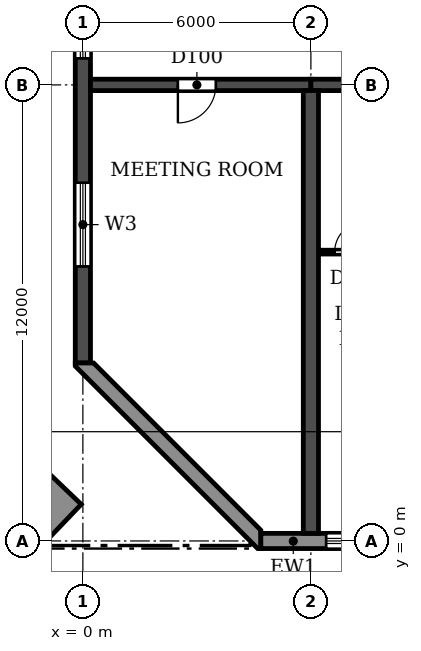
"""IFC4 building model, lengths in metres.
Left out: names, types, materials, properties, quantities, classifications, styles, units other than length and angle.
Written with IfcOpenShell. Run it as: python <this file> out.ifc"""

import sys

from ifc_helpers import new_model, si_unit, direction, frame, frame_2d, origin, place, context, subcontext, project, spatial, polyline, rectangle, outline, extrude, source, transform, mapped, element, fill, save


model = new_model("IFC4")
c1 = context("Model", 3, precision=1e-05, world=origin(), true_north=direction((0.0, 1.0)))
c2 = subcontext(c1, "Body", "Model", "MODEL_VIEW")
j1 = project(units=[si_unit("LENGTHUNIT", "METRE"), si_unit("PLANEANGLEUNIT", "RADIAN")], contexts=[c1])
p1 = place(None, origin())
s1 = spatial("IfcSite", under=j1, at=p1, CompositionType="ELEMENT")
p2 = place(p1, origin())
s2 = spatial("IfcBuilding", under=s1, at=p2, CompositionType="ELEMENT")
p3 = place(p2, frame((0.0, 0.0, 23.4)))
s3 = spatial("IfcBuildingStorey", under=s2, at=p3, CompositionType="ELEMENT", Elevation=23.4)
p4 = place(p3, frame((6.0, 0.2, 0.0), z_axis=(0.0, 0.0, 1.0), x_axis=(0.0, 1.0, 0.0)))
e1 = element("IfcWall", 1, at=p4, inside=s3, PredefinedType="SHEAR", context=c2, shape_type="SweptSolid", body=[
    extrude(rectangle(XDim=11.65, YDim=0.4, at=frame_2d((5.825, 0.0))), origin(), (0.0, 0.0, 1.0), 3.05),
])
p5 = place(p3, frame((0.0, 4.683, 0.0), z_axis=(0.0, 0.0, 1.0), x_axis=(0.0, 1.0, 0.0)))
e2 = element("IfcWall", 2, at=p5, inside=s3, PredefinedType="SHEAR", context=c2, shape_type="SweptSolid", body=[
    extrude(rectangle(XDim=35.434, YDim=0.4, at=frame_2d((17.717, 0.0))), origin(), (0.0, 0.0, 1.0), 3.05),
])
p6 = place(p5, frame((23.817, 0.0, 0.9)))
e3 = element("IfcOpeningElement", 3, at=p6, cuts=e2, PredefinedType="OPENING", context=c2, shape_type="SweptSolid", body=[
    extrude(rectangle(XDim=1.2, YDim=1.5, at=frame_2d((0.6, 0.75))), frame((0.0, 0.21, 0.0), z_axis=(0.0, -1.0, 0.0), x_axis=(1.0, 0.0, 0.0)), (0.0, 0.0, 1.0), 0.42),
])
p7 = place(p5, frame((8.017, 0.0, 0.9)))
e4 = element("IfcOpeningElement", 4, at=p7, cuts=e2, PredefinedType="OPENING", context=c2, shape_type="SweptSolid", body=[
    extrude(rectangle(XDim=1.2, YDim=1.5, at=frame_2d((0.6, 0.75))), frame((0.0, 0.21, 0.0), z_axis=(0.0, -1.0, 0.0), x_axis=(1.0, 0.0, 0.0)), (0.0, 0.0, 1.0), 0.42),
])
p8 = place(p5, frame((15.917, 0.0, 0.9)))
e5 = element("IfcOpeningElement", 5, at=p8, cuts=e2, PredefinedType="OPENING", context=c2, shape_type="SweptSolid", body=[
    extrude(rectangle(XDim=1.2, YDim=1.5, at=frame_2d((0.6, 0.75))), frame((0.0, 0.21, 0.0), z_axis=(0.0, -1.0, 0.0), x_axis=(1.0, 0.0, 0.0)), (0.0, 0.0, 1.0), 0.42),
])
p9 = place(p5, frame((29.493, 0.0, 0.6)))
e6 = element("IfcOpeningElement", 6, at=p9, cuts=e2, PredefinedType="OPENING", context=c2, shape_type="SweptSolid", body=[
    extrude(rectangle(XDim=2.2, YDim=1.8, at=frame_2d((1.1, 0.9))), frame((0.0, 0.21, 0.0), z_axis=(0.0, -1.0, 0.0), x_axis=(1.0, 0.0, 0.0)), (0.0, 0.0, 1.0), 0.42),
])
p10 = place(p5, frame((2.541, 0.0, 0.6)))
e7 = element("IfcOpeningElement", 7, at=p10, cuts=e2, PredefinedType="OPENING", context=c2, shape_type="SweptSolid", body=[
    extrude(rectangle(XDim=2.2, YDim=1.8, at=frame_2d((1.1, 0.9))), frame((0.0, 0.21, 0.0), z_axis=(0.0, -1.0, 0.0), x_axis=(1.0, 0.0, 0.0)), (0.0, 0.0, 1.0), 0.42),
])
p11 = place(p3, frame((0.2, 12.0, 0.0), z_axis=(0.0, 0.0, 1.0), x_axis=(1.0, 0.0, 0.0)))
e8 = element("IfcWall", 8, at=p11, inside=s3, PredefinedType="SHEAR", context=c2, shape_type="SweptSolid", body=[
    extrude(rectangle(XDim=5.8, YDim=0.3, at=frame_2d((2.9, 0.0))), origin(), (0.0, 0.0, 1.0), 2.45),
])
p12 = place(p11, frame((2.3, 0.0, 0.0)))
e9 = element("IfcOpeningElement", 9, at=p12, cuts=e8, PredefinedType="OPENING", context=c2, shape_type="SweptSolid", body=[
    extrude(rectangle(XDim=1.0, YDim=2.1, at=frame_2d((0.5, 1.05))), frame((0.0, 0.16, 0.0), z_axis=(0.0, -1.0, 0.0), x_axis=(1.0, 0.0, 0.0)), (0.0, 0.0, 1.0), 0.32),
])
p13 = place(p3, frame((6.0, 12.0, 0.0), z_axis=(0.0, 0.0, 1.0), x_axis=(1.0, 0.0, 0.0)))
e10 = element("IfcWall", 10, at=p13, inside=s3, PredefinedType="SHEAR", context=c2, shape_type="SweptSolid", body=[
    extrude(rectangle(XDim=6.0, YDim=0.3, at=frame_2d((3.0, 0.0))), origin(), (0.0, 0.0, 1.0), 2.45),
])
p14 = place(p13, frame((2.45, 0.0, 0.0)))
e11 = element("IfcOpeningElement", 11, at=p14, cuts=e10, PredefinedType="OPENING", context=c2, shape_type="SweptSolid", body=[
    extrude(rectangle(XDim=1.0, YDim=2.1, at=frame_2d((0.5, 1.05))), frame((0.0, 0.16, 0.0), z_axis=(0.0, -1.0, 0.0), x_axis=(1.0, 0.0, 0.0)), (0.0, 0.0, 1.0), 0.32),
])
p15 = place(p3, frame((4.683, 0.0, 0.0), z_axis=(0.0, 0.0, 1.0), x_axis=(1.0, 0.0, 0.0)))
e12 = element("IfcWall", 12, at=p15, inside=s3, PredefinedType="STANDARD", context=c2, shape_type="SweptSolid", body=[
    extrude(rectangle(XDim=92.634, YDim=0.4, at=frame_2d((46.317, 0.0))), origin(), (0.0, 0.0, 1.0), 3.05),
])
p16 = place(p15, frame((1.717, 0.0, 0.9)))
e13 = element("IfcOpeningElement", 13, at=p16, cuts=e12, PredefinedType="OPENING", context=c2, shape_type="SweptSolid", body=[
    extrude(rectangle(XDim=2.2, YDim=1.5, at=frame_2d((1.1, 0.75))), frame((0.0, 0.21, 0.0), z_axis=(0.0, -1.0, 0.0), x_axis=(1.0, 0.0, 0.0)), (0.0, 0.0, 1.0), 0.42),
])
p17 = place(p15, frame((4.717, 0.0, 0.9)))
e14 = element("IfcOpeningElement", 14, at=p17, cuts=e12, PredefinedType="OPENING", context=c2, shape_type="SweptSolid", body=[
    extrude(rectangle(XDim=2.2, YDim=1.5, at=frame_2d((1.1, 0.75))), frame((0.0, 0.21, 0.0), z_axis=(0.0, -1.0, 0.0), x_axis=(1.0, 0.0, 0.0)), (0.0, 0.0, 1.0), 0.42),
])
p18 = place(p15, frame((7.717, 0.0, 0.9)))
e15 = element("IfcOpeningElement", 15, at=p18, cuts=e12, PredefinedType="OPENING", context=c2, shape_type="SweptSolid", body=[
    extrude(rectangle(XDim=2.2, YDim=1.5, at=frame_2d((1.1, 0.75))), frame((0.0, 0.21, 0.0), z_axis=(0.0, -1.0, 0.0), x_axis=(1.0, 0.0, 0.0)), (0.0, 0.0, 1.0), 0.42),
])
p19 = place(p15, frame((10.717, 0.0, 0.9)))
e16 = element("IfcOpeningElement", 16, at=p19, cuts=e12, PredefinedType="OPENING", context=c2, shape_type="SweptSolid", body=[
    extrude(rectangle(XDim=2.2, YDim=1.5, at=frame_2d((1.1, 0.75))), frame((0.0, 0.21, 0.0), z_axis=(0.0, -1.0, 0.0), x_axis=(1.0, 0.0, 0.0)), (0.0, 0.0, 1.0), 0.42),
])
p20 = place(p15, frame((13.717, 0.0, 0.9)))
e17 = element("IfcOpeningElement", 17, at=p20, cuts=e12, PredefinedType="OPENING", context=c2, shape_type="SweptSolid", body=[
    extrude(rectangle(XDim=2.2, YDim=1.5, at=frame_2d((1.1, 0.75))), frame((0.0, 0.21, 0.0), z_axis=(0.0, -1.0, 0.0), x_axis=(1.0, 0.0, 0.0)), (0.0, 0.0, 1.0), 0.42),
])
p21 = place(p15, frame((16.717, 0.0, 0.9)))
e18 = element("IfcOpeningElement", 18, at=p21, cuts=e12, PredefinedType="OPENING", context=c2, shape_type="SweptSolid", body=[
    extrude(rectangle(XDim=2.2, YDim=1.5, at=frame_2d((1.1, 0.75))), frame((0.0, 0.21, 0.0), z_axis=(0.0, -1.0, 0.0), x_axis=(1.0, 0.0, 0.0)), (0.0, 0.0, 1.0), 0.42),
])
p22 = place(p15, frame((19.917, 0.0, 0.0)))
e19 = element("IfcOpeningElement", 19, at=p22, cuts=e12, PredefinedType="OPENING", context=c2, shape_type="SweptSolid", body=[
    extrude(rectangle(XDim=1.8, YDim=2.4, at=frame_2d((0.9, 1.2))), frame((0.0, 0.21, 0.0), z_axis=(0.0, -1.0, 0.0), x_axis=(1.0, 0.0, 0.0)), (0.0, 0.0, 1.0), 0.42),
])
p23 = place(p15, frame((22.717, 0.0, 0.9)))
e20 = element("IfcOpeningElement", 20, at=p23, cuts=e12, PredefinedType="OPENING", context=c2, shape_type="SweptSolid", body=[
    extrude(rectangle(XDim=2.2, YDim=1.5, at=frame_2d((1.1, 0.75))), frame((0.0, 0.21, 0.0), z_axis=(0.0, -1.0, 0.0), x_axis=(1.0, 0.0, 0.0)), (0.0, 0.0, 1.0), 0.42),
])
p24 = place(p15, frame((25.717, 0.0, 0.9)))
e21 = element("IfcOpeningElement", 21, at=p24, cuts=e12, PredefinedType="OPENING", context=c2, shape_type="SweptSolid", body=[
    extrude(rectangle(XDim=2.2, YDim=1.5, at=frame_2d((1.1, 0.75))), frame((0.0, 0.21, 0.0), z_axis=(0.0, -1.0, 0.0), x_axis=(1.0, 0.0, 0.0)), (0.0, 0.0, 1.0), 0.42),
])
p25 = place(p15, frame((28.717, 0.0, 0.9)))
e22 = element("IfcOpeningElement", 22, at=p25, cuts=e12, PredefinedType="OPENING", context=c2, shape_type="SweptSolid", body=[
    extrude(rectangle(XDim=2.2, YDim=1.5, at=frame_2d((1.1, 0.75))), frame((0.0, 0.21, 0.0), z_axis=(0.0, -1.0, 0.0), x_axis=(1.0, 0.0, 0.0)), (0.0, 0.0, 1.0), 0.42),
])
p26 = place(p15, frame((31.917, 0.0, 0.0)))
e23 = element("IfcOpeningElement", 23, at=p26, cuts=e12, PredefinedType="OPENING", context=c2, shape_type="SweptSolid", body=[
    extrude(rectangle(XDim=1.8, YDim=2.4, at=frame_2d((0.9, 1.2))), frame((0.0, 0.21, 0.0), z_axis=(0.0, -1.0, 0.0), x_axis=(1.0, 0.0, 0.0)), (0.0, 0.0, 1.0), 0.42),
])
p27 = place(p15, frame((34.717, 0.0, 0.9)))
e24 = element("IfcOpeningElement", 24, at=p27, cuts=e12, PredefinedType="OPENING", context=c2, shape_type="SweptSolid", body=[
    extrude(rectangle(XDim=2.2, YDim=1.5, at=frame_2d((1.1, 0.75))), frame((0.0, 0.21, 0.0), z_axis=(0.0, -1.0, 0.0), x_axis=(1.0, 0.0, 0.0)), (0.0, 0.0, 1.0), 0.42),
])
p28 = place(p15, frame((37.717, 0.0, 0.9)))
e25 = element("IfcOpeningElement", 25, at=p28, cuts=e12, PredefinedType="OPENING", context=c2, shape_type="SweptSolid", body=[
    extrude(rectangle(XDim=2.2, YDim=1.5, at=frame_2d((1.1, 0.75))), frame((0.0, 0.21, 0.0), z_axis=(0.0, -1.0, 0.0), x_axis=(1.0, 0.0, 0.0)), (0.0, 0.0, 1.0), 0.42),
])
p29 = place(p15, frame((40.717, 0.0, 0.9)))
e26 = element("IfcOpeningElement", 26, at=p29, cuts=e12, PredefinedType="OPENING", context=c2, shape_type="SweptSolid", body=[
    extrude(rectangle(XDim=2.2, YDim=1.5, at=frame_2d((1.1, 0.75))), frame((0.0, 0.21, 0.0), z_axis=(0.0, -1.0, 0.0), x_axis=(1.0, 0.0, 0.0)), (0.0, 0.0, 1.0), 0.42),
])
p30 = place(p15, frame((43.917, 0.0, 0.0)))
e27 = element("IfcOpeningElement", 27, at=p30, cuts=e12, PredefinedType="OPENING", context=c2, shape_type="SweptSolid", body=[
    extrude(rectangle(XDim=1.8, YDim=2.4, at=frame_2d((0.9, 1.2))), frame((0.0, 0.21, 0.0), z_axis=(0.0, -1.0, 0.0), x_axis=(1.0, 0.0, 0.0)), (0.0, 0.0, 1.0), 0.42),
])
p31 = place(p15, frame((46.717, 0.0, 0.9)))
e28 = element("IfcOpeningElement", 28, at=p31, cuts=e12, PredefinedType="OPENING", context=c2, shape_type="SweptSolid", body=[
    extrude(rectangle(XDim=2.2, YDim=1.5, at=frame_2d((1.1, 0.75))), frame((0.0, 0.21, 0.0), z_axis=(0.0, -1.0, 0.0), x_axis=(1.0, 0.0, 0.0)), (0.0, 0.0, 1.0), 0.42),
])
p32 = place(p15, frame((49.717, 0.0, 0.9)))
e29 = element("IfcOpeningElement", 29, at=p32, cuts=e12, PredefinedType="OPENING", context=c2, shape_type="SweptSolid", body=[
    extrude(rectangle(XDim=2.2, YDim=1.5, at=frame_2d((1.1, 0.75))), frame((0.0, 0.21, 0.0), z_axis=(0.0, -1.0, 0.0), x_axis=(1.0, 0.0, 0.0)), (0.0, 0.0, 1.0), 0.42),
])
p33 = place(p15, frame((52.717, 0.0, 0.9)))
e30 = element("IfcOpeningElement", 30, at=p33, cuts=e12, PredefinedType="OPENING", context=c2, shape_type="SweptSolid", body=[
    extrude(rectangle(XDim=2.2, YDim=1.5, at=frame_2d((1.1, 0.75))), frame((0.0, 0.21, 0.0), z_axis=(0.0, -1.0, 0.0), x_axis=(1.0, 0.0, 0.0)), (0.0, 0.0, 1.0), 0.42),
])
p34 = place(p15, frame((55.717, 0.0, 0.9)))
e31 = element("IfcOpeningElement", 31, at=p34, cuts=e12, PredefinedType="OPENING", context=c2, shape_type="SweptSolid", body=[
    extrude(rectangle(XDim=2.2, YDim=1.5, at=frame_2d((1.1, 0.75))), frame((0.0, 0.21, 0.0), z_axis=(0.0, -1.0, 0.0), x_axis=(1.0, 0.0, 0.0)), (0.0, 0.0, 1.0), 0.42),
])
p35 = place(p15, frame((58.917, 0.0, 0.0)))
e32 = element("IfcOpeningElement", 32, at=p35, cuts=e12, PredefinedType="OPENING", context=c2, shape_type="SweptSolid", body=[
    extrude(rectangle(XDim=1.8, YDim=2.4, at=frame_2d((0.9, 1.2))), frame((0.0, 0.21, 0.0), z_axis=(0.0, -1.0, 0.0), x_axis=(1.0, 0.0, 0.0)), (0.0, 0.0, 1.0), 0.42),
])
p36 = place(p15, frame((61.717, 0.0, 0.9)))
e33 = element("IfcOpeningElement", 33, at=p36, cuts=e12, PredefinedType="OPENING", context=c2, shape_type="SweptSolid", body=[
    extrude(rectangle(XDim=2.2, YDim=1.5, at=frame_2d((1.1, 0.75))), frame((0.0, 0.21, 0.0), z_axis=(0.0, -1.0, 0.0), x_axis=(1.0, 0.0, 0.0)), (0.0, 0.0, 1.0), 0.42),
])
p37 = place(p15, frame((64.717, 0.0, 0.9)))
e34 = element("IfcOpeningElement", 34, at=p37, cuts=e12, PredefinedType="OPENING", context=c2, shape_type="SweptSolid", body=[
    extrude(rectangle(XDim=2.2, YDim=1.5, at=frame_2d((1.1, 0.75))), frame((0.0, 0.21, 0.0), z_axis=(0.0, -1.0, 0.0), x_axis=(1.0, 0.0, 0.0)), (0.0, 0.0, 1.0), 0.42),
])
p38 = place(p15, frame((67.717, 0.0, 0.9)))
e35 = element("IfcOpeningElement", 35, at=p38, cuts=e12, PredefinedType="OPENING", context=c2, shape_type="SweptSolid", body=[
    extrude(rectangle(XDim=2.2, YDim=1.5, at=frame_2d((1.1, 0.75))), frame((0.0, 0.21, 0.0), z_axis=(0.0, -1.0, 0.0), x_axis=(1.0, 0.0, 0.0)), (0.0, 0.0, 1.0), 0.42),
])
p39 = place(p15, frame((70.917, 0.0, 0.0)))
e36 = element("IfcOpeningElement", 36, at=p39, cuts=e12, PredefinedType="OPENING", context=c2, shape_type="SweptSolid", body=[
    extrude(rectangle(XDim=1.8, YDim=2.4, at=frame_2d((0.9, 1.2))), frame((0.0, 0.21, 0.0), z_axis=(0.0, -1.0, 0.0), x_axis=(1.0, 0.0, 0.0)), (0.0, 0.0, 1.0), 0.42),
])
p40 = place(p15, frame((73.717, 0.0, 0.9)))
e37 = element("IfcOpeningElement", 37, at=p40, cuts=e12, PredefinedType="OPENING", context=c2, shape_type="SweptSolid", body=[
    extrude(rectangle(XDim=2.2, YDim=1.5, at=frame_2d((1.1, 0.75))), frame((0.0, 0.21, 0.0), z_axis=(0.0, -1.0, 0.0), x_axis=(1.0, 0.0, 0.0)), (0.0, 0.0, 1.0), 0.42),
])
p41 = place(p15, frame((76.717, 0.0, 0.9)))
e38 = element("IfcOpeningElement", 38, at=p41, cuts=e12, PredefinedType="OPENING", context=c2, shape_type="SweptSolid", body=[
    extrude(rectangle(XDim=2.2, YDim=1.5, at=frame_2d((1.1, 0.75))), frame((0.0, 0.21, 0.0), z_axis=(0.0, -1.0, 0.0), x_axis=(1.0, 0.0, 0.0)), (0.0, 0.0, 1.0), 0.42),
])
p42 = place(p15, frame((79.717, 0.0, 0.9)))
e39 = element("IfcOpeningElement", 39, at=p42, cuts=e12, PredefinedType="OPENING", context=c2, shape_type="SweptSolid", body=[
    extrude(rectangle(XDim=2.2, YDim=1.5, at=frame_2d((1.1, 0.75))), frame((0.0, 0.21, 0.0), z_axis=(0.0, -1.0, 0.0), x_axis=(1.0, 0.0, 0.0)), (0.0, 0.0, 1.0), 0.42),
])
p43 = place(p15, frame((82.717, 0.0, 0.9)))
e40 = element("IfcOpeningElement", 40, at=p43, cuts=e12, PredefinedType="OPENING", context=c2, shape_type="SweptSolid", body=[
    extrude(rectangle(XDim=2.2, YDim=1.5, at=frame_2d((1.1, 0.75))), frame((0.0, 0.21, 0.0), z_axis=(0.0, -1.0, 0.0), x_axis=(1.0, 0.0, 0.0)), (0.0, 0.0, 1.0), 0.42),
])
p44 = place(p15, frame((85.717, 0.0, 0.9)))
e41 = element("IfcOpeningElement", 41, at=p44, cuts=e12, PredefinedType="OPENING", context=c2, shape_type="SweptSolid", body=[
    extrude(rectangle(XDim=2.2, YDim=1.5, at=frame_2d((1.1, 0.75))), frame((0.0, 0.21, 0.0), z_axis=(0.0, -1.0, 0.0), x_axis=(1.0, 0.0, 0.0)), (0.0, 0.0, 1.0), 0.42),
])
p45 = place(p15, frame((88.717, 0.0, 0.9)))
e42 = element("IfcOpeningElement", 42, at=p45, cuts=e12, PredefinedType="OPENING", context=c2, shape_type="SweptSolid", body=[
    extrude(rectangle(XDim=2.2, YDim=1.5, at=frame_2d((1.1, 0.75))), frame((0.0, 0.21, 0.0), z_axis=(0.0, -1.0, 0.0), x_axis=(1.0, 0.0, 0.0)), (0.0, 0.0, 1.0), 0.42),
])
p46 = place(p3, origin())
e43 = element("IfcWall", 43, at=p46, inside=s3, PredefinedType="STANDARD", context=c2, shape_type="SweptSolid", body=[
    extrude(outline(polyline([(-0.2, 4.683), (-0.2, 4.6), (4.6, -0.2), (4.683, -0.2), (4.683, 0.283), (0.283, 4.683), (-0.2, 4.683)])), origin(), (0.0, 0.0, 1.0), 3.05),
])
m1 = source(origin(), c2, "Body", "SweptSolid", [
    extrude(outline(polyline([(0.0, 0.0), (1.84, -1.76), (2.669, -0.893), (0.829, 0.867), (0.0, 0.0)])), origin(), (0.0, 0.0, 1.0), 0.6),
])
p47 = place(p3, frame((-2.713, 1.857, 0.0)))
e44 = element("IfcWall", 44, at=p47, inside=s3, PredefinedType="USERDEFINED", context=c2, shape_type="MappedRepresentation", body=[
    mapped(m1, transform((0.0, 0.0, 0.0))),
])
p48 = place(p3, frame((6.21, 7.6, 0.0), z_axis=(0.0, 0.0, 1.0), x_axis=(1.0, 0.0, 0.0)))
e45 = element("IfcWall", 45, at=p48, inside=s3, PredefinedType="PARTITIONING", context=c2, shape_type="SweptSolid", body=[
    extrude(rectangle(XDim=1.89, YDim=0.1, at=frame_2d((0.945, 0.0))), origin(), (0.0, 0.0, 1.0), 3.05),
])
p49 = place(p48, frame((0.415, 0.0, 0.0)))
e46 = element("IfcOpeningElement", 46, at=p49, cuts=e45, PredefinedType="OPENING", context=c2, shape_type="SweptSolid", body=[
    extrude(rectangle(XDim=0.8, YDim=2.1, at=frame_2d((0.4, 1.05))), frame((0.0, 0.06, 0.0), z_axis=(0.0, -1.0, 0.0), x_axis=(1.0, 0.0, 0.0)), (0.0, 0.0, 1.0), 0.12),
])
p50 = place(p16, origin())
e47 = element("IfcWindow", 47, at=p50, inside=s3, PartitioningType="DOUBLE_PANEL_HORIZONTAL", PredefinedType="WINDOW", context=c2, shape_type="SweptSolid", body=[
    extrude(rectangle(XDim=2.2, YDim=1.5, at=frame_2d((1.1, 0.75))), frame((0.0, 0.03, 0.0), z_axis=(0.0, -1.0, 0.0), x_axis=(1.0, 0.0, 0.0)), (0.0, 0.0, 1.0), 0.06),
])
fill(e13, e47)
p51 = place(p7, origin())
e48 = element("IfcWindow", 48, at=p51, inside=s3, PartitioningType="SINGLE_PANEL", PredefinedType="WINDOW", context=c2, shape_type="SweptSolid", body=[
    extrude(rectangle(XDim=1.2, YDim=1.5, at=frame_2d((0.6, 0.75))), frame((0.0, 0.03, 0.0), z_axis=(0.0, -1.0, 0.0), x_axis=(1.0, 0.0, 0.0)), (0.0, 0.0, 1.0), 0.06),
])
fill(e4, e48)
p52 = place(p10, origin())
e49 = element("IfcWindow", 49, at=p52, inside=s3, PartitioningType="DOUBLE_PANEL_HORIZONTAL", PredefinedType="WINDOW", context=c2, shape_type="SweptSolid", body=[
    extrude(rectangle(XDim=2.2, YDim=1.8, at=frame_2d((1.1, 0.9))), frame((0.0, 0.03, 0.0), z_axis=(0.0, -1.0, 0.0), x_axis=(1.0, 0.0, 0.0)), (0.0, 0.0, 1.0), 0.06),
])
fill(e7, e49)
p53 = place(p12, frame((1.0, 0.0, 0.0), z_axis=(0.0, 0.0, 1.0), x_axis=(-1.0, 0.0, 0.0)))
e50 = element("IfcDoor", 50, at=p53, inside=s3, OperationType="SINGLE_SWING_RIGHT", PredefinedType="DOOR", context=c2, shape_type="SweptSolid", body=[
    extrude(rectangle(XDim=1.0, YDim=2.1, at=frame_2d((0.5, 1.05))), frame((0.0, 0.025, 0.0), z_axis=(0.0, -1.0, 0.0), x_axis=(1.0, 0.0, 0.0)), (0.0, 0.0, 1.0), 0.05),
])
fill(e9, e50)
p54 = place(p49, origin())
e51 = element("IfcDoor", 51, at=p54, inside=s3, OperationType="SINGLE_SWING_RIGHT", PredefinedType="DOOR", context=c2, shape_type="SweptSolid", body=[
    extrude(rectangle(XDim=0.8, YDim=2.1, at=frame_2d((0.4, 1.05))), frame((0.0, 0.025, 0.0), z_axis=(0.0, -1.0, 0.0), x_axis=(1.0, 0.0, 0.0)), (0.0, 0.0, 1.0), 0.05),
])
fill(e46, e51)
save(model, sys.argv[1])
